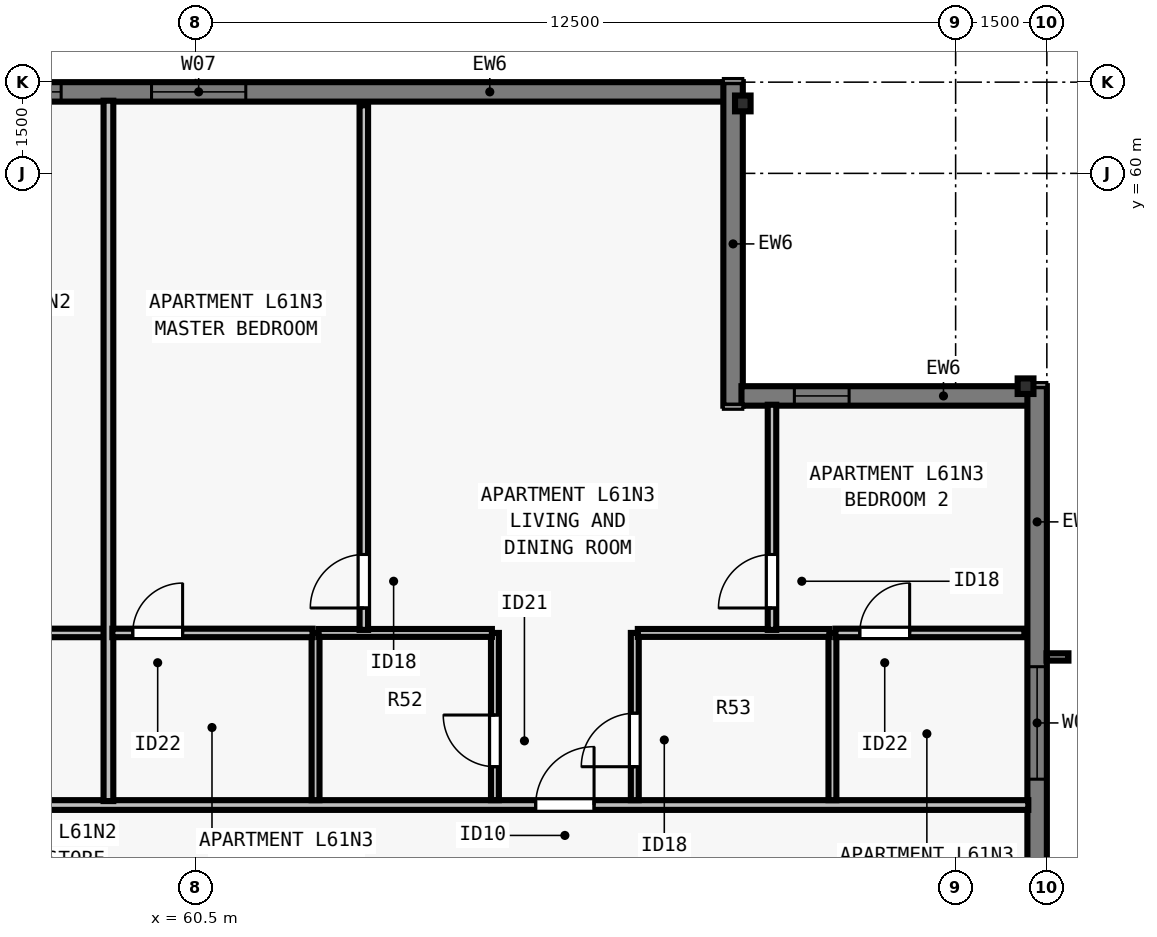
"""IFC4 building model, lengths in metres.
Left out: names, types, materials, properties, quantities, classifications, styles, units other than length and angle.
Written with IfcOpenShell. Run it as: python <this file> out.ifc"""

import sys

from ifc_helpers import new_model, si_unit, direction, frame, frame_2d, origin, origin_2d, place, context, subcontext, project, spatial, rectangle, i_section, extrude, element, fill, save


model = new_model("IFC4")
c1 = context("Model", 3, precision=1e-05, world=origin(), true_north=direction((0.0, 1.0)))
c2 = subcontext(c1, "Body", "Model", "MODEL_VIEW")
j1 = project(units=[si_unit("LENGTHUNIT", "METRE"), si_unit("PLANEANGLEUNIT", "RADIAN")], contexts=[c1])
p1 = place(None, origin())
s1 = spatial("IfcSite", under=j1, at=p1, CompositionType="ELEMENT")
p2 = place(p1, origin())
s2 = spatial("IfcBuilding", under=s1, at=p2, CompositionType="ELEMENT")
p3 = place(p2, frame((0.0, 0.0, 223.5)))
s3 = spatial("IfcBuildingStorey", under=s2, at=p3, CompositionType="ELEMENT", Elevation=223.5)
for number, where, z_axis, x_axis in (
    (1, (74.15, 56.5, 0.0), (0.0, 0.0, 1.0), (0.0, 1.0, 0.0)),
    (2, (69.5, 61.15, 0.0), (0.0, 0.0, 1.0), (1.0, 0.0, 0.0)),
):
    element("IfcColumn", number, at=place(p3, frame(where, z_axis=z_axis, x_axis=x_axis)), inside=s3, PredefinedType="COLUMN", context=c2, shape_type="SweptSolid", body=[
        extrude(i_section(OverallWidth=0.256, OverallDepth=0.26, WebThickness=0.01, FlangeThickness=0.017, FilletRadius=0.013, at=origin_2d()), origin(), (0.0, 0.0, 1.0), 3.5),
    ])
p4 = place(p3, frame((46.6, 61.34, 0.0), z_axis=(0.0, 0.0, 1.0), x_axis=(1.0, 0.0, 0.0)))
e3 = element("IfcWall", 3, at=p4, inside=s3, PredefinedType="SOLIDWALL", context=c2, shape_type="SweptSolid", body=[
    extrude(rectangle(XDim=22.602, YDim=0.32, at=frame_2d((11.301, 0.0))), origin(), (0.0, 0.0, 1.0), 3.29),
])
p5 = place(p4, frame((3.325, 0.0, 0.8)))
e4 = element("IfcOpeningElement", 4, at=p5, cuts=e3, PredefinedType="OPENING", context=c2, shape_type="SweptSolid", body=[
    extrude(rectangle(XDim=1.85, YDim=1.678, at=frame_2d((0.925, 0.839))), frame((0.0, 0.17, 0.0), z_axis=(0.0, -1.0, 0.0), x_axis=(1.0, 0.0, 0.0)), (0.0, 0.0, 1.0), 0.34),
])
p6 = place(p4, frame((5.726, 0.0, 0.8)))
e5 = element("IfcOpeningElement", 5, at=p6, cuts=e3, PredefinedType="OPENING", context=c2, shape_type="SweptSolid", body=[
    extrude(rectangle(XDim=1.55, YDim=1.678, at=frame_2d((0.775, 0.839))), frame((0.0, 0.17, 0.0), z_axis=(0.0, -1.0, 0.0), x_axis=(1.0, 0.0, 0.0)), (0.0, 0.0, 1.0), 0.34),
])
p7 = place(p4, frame((13.177, 0.0, 0.8)))
e6 = element("IfcOpeningElement", 6, at=p7, cuts=e3, PredefinedType="OPENING", context=c2, shape_type="SweptSolid", body=[
    extrude(rectangle(XDim=1.55, YDim=1.678, at=frame_2d((0.775, 0.839))), frame((0.0, 0.17, 0.0), z_axis=(0.0, -1.0, 0.0), x_axis=(1.0, 0.0, 0.0)), (0.0, 0.0, 1.0), 0.34),
])
p8 = place(p4, frame((1.19, 0.0, 0.8)))
e7 = element("IfcOpeningElement", 7, at=p8, cuts=e3, PredefinedType="OPENING", context=c2, shape_type="SweptSolid", body=[
    extrude(rectangle(XDim=0.9, YDim=1.678, at=frame_2d((0.45, 0.839))), frame((0.0, 0.17, 0.0), z_axis=(0.0, -1.0, 0.0), x_axis=(1.0, 0.0, 0.0)), (0.0, 0.0, 1.0), 0.34),
])
p9 = place(p4, frame((10.79, 0.0, 0.8)))
e8 = element("IfcOpeningElement", 8, at=p9, cuts=e3, PredefinedType="OPENING", context=c2, shape_type="SweptSolid", body=[
    extrude(rectangle(XDim=0.9, YDim=1.678, at=frame_2d((0.45, 0.839))), frame((0.0, 0.17, 0.0), z_axis=(0.0, -1.0, 0.0), x_axis=(1.0, 0.0, 0.0)), (0.0, 0.0, 1.0), 0.34),
])
p10 = place(p3, frame((69.34, 61.5, 0.0), z_axis=(0.0, 0.0, 1.0), x_axis=(0.0, -1.0, 0.0)))
e9 = element("IfcWall", 9, at=p10, inside=s3, PredefinedType="SOLIDWALL", context=c2, shape_type="SweptSolid", body=[
    extrude(rectangle(XDim=5.32, YDim=0.32, at=frame_2d((2.66, 0.0))), origin(), (0.0, 0.0, 1.0), 3.29),
])
p11 = place(p3, frame((69.478, 56.34, 0.0), z_axis=(0.0, 0.0, 1.0), x_axis=(1.0, 0.0, 0.0)))
e10 = element("IfcWall", 10, at=p11, inside=s3, PredefinedType="SOLIDWALL", context=c2, shape_type="SweptSolid", body=[
    extrude(rectangle(XDim=4.724, YDim=0.32, at=frame_2d((2.362, 0.0))), origin(), (0.0, 0.0, 1.0), 3.29),
])
p12 = place(p11, frame((0.87, 0.0, 0.8)))
e11 = element("IfcOpeningElement", 11, at=p12, cuts=e10, PredefinedType="OPENING", context=c2, shape_type="SweptSolid", body=[
    extrude(rectangle(XDim=0.9, YDim=1.678, at=frame_2d((0.45, 0.839))), frame((0.0, 0.17, 0.0), z_axis=(0.0, -1.0, 0.0), x_axis=(1.0, 0.0, 0.0)), (0.0, 0.0, 1.0), 0.34),
])
p13 = place(p3, frame((74.34, 56.5, 0.0), z_axis=(0.0, 0.0, 1.0), x_axis=(0.0, -1.0, 0.0)))
e12 = element("IfcWall", 12, at=p13, inside=s3, PredefinedType="SOLIDWALL", context=c2, shape_type="SweptSolid", body=[
    extrude(rectangle(XDim=34.702, YDim=0.32, at=frame_2d((17.351, 0.0))), origin(), (0.0, 0.0, 1.0), 3.29),
])
p14 = place(p13, frame((4.613, 0.0, 0.8)))
e13 = element("IfcOpeningElement", 13, at=p14, cuts=e12, PredefinedType="OPENING", context=c2, shape_type="SweptSolid", body=[
    extrude(rectangle(XDim=1.85, YDim=1.678, at=frame_2d((0.925, 0.839))), frame((0.0, 0.17, 0.0), z_axis=(0.0, -1.0, 0.0), x_axis=(1.0, 0.0, 0.0)), (0.0, 0.0, 1.0), 0.34),
])
p15 = place(p13, frame((9.388, 0.0, 0.8)))
e14 = element("IfcOpeningElement", 14, at=p15, cuts=e12, PredefinedType="OPENING", context=c2, shape_type="SweptSolid", body=[
    extrude(rectangle(XDim=1.55, YDim=1.678, at=frame_2d((0.775, 0.839))), frame((0.0, 0.17, 0.0), z_axis=(0.0, -1.0, 0.0), x_axis=(1.0, 0.0, 0.0)), (0.0, 0.0, 1.0), 0.34),
])
p16 = place(p13, frame((14.888, 0.0, 0.8)))
e15 = element("IfcOpeningElement", 15, at=p16, cuts=e12, PredefinedType="OPENING", context=c2, shape_type="SweptSolid", body=[
    extrude(rectangle(XDim=1.55, YDim=1.678, at=frame_2d((0.775, 0.839))), frame((0.0, 0.17, 0.0), z_axis=(0.0, -1.0, 0.0), x_axis=(1.0, 0.0, 0.0)), (0.0, 0.0, 1.0), 0.34),
])
p17 = place(p13, frame((18.114, 0.0, 0.8)))
e16 = element("IfcOpeningElement", 16, at=p17, cuts=e12, PredefinedType="OPENING", context=c2, shape_type="SweptSolid", body=[
    extrude(rectangle(XDim=1.85, YDim=1.678, at=frame_2d((0.925, 0.839))), frame((0.0, 0.17, 0.0), z_axis=(0.0, -1.0, 0.0), x_axis=(1.0, 0.0, 0.0)), (0.0, 0.0, 1.0), 0.34),
])
p18 = place(p13, frame((23.614, 0.0, 0.8)))
e17 = element("IfcOpeningElement", 17, at=p18, cuts=e12, PredefinedType="OPENING", context=c2, shape_type="SweptSolid", body=[
    extrude(rectangle(XDim=1.85, YDim=1.678, at=frame_2d((0.925, 0.839))), frame((0.0, 0.17, 0.0), z_axis=(0.0, -1.0, 0.0), x_axis=(1.0, 0.0, 0.0)), (0.0, 0.0, 1.0), 0.34),
])
p19 = place(p13, frame((28.839, 0.0, 0.8)))
e18 = element("IfcOpeningElement", 18, at=p19, cuts=e12, PredefinedType="OPENING", context=c2, shape_type="SweptSolid", body=[
    extrude(rectangle(XDim=1.55, YDim=1.678, at=frame_2d((0.775, 0.839))), frame((0.0, 0.17, 0.0), z_axis=(0.0, -1.0, 0.0), x_axis=(1.0, 0.0, 0.0)), (0.0, 0.0, 1.0), 0.34),
])
p20 = place(p13, frame((31.35, 0.0, 0.8)))
e19 = element("IfcOpeningElement", 19, at=p20, cuts=e12, PredefinedType="OPENING", context=c2, shape_type="SweptSolid", body=[
    extrude(rectangle(XDim=0.9, YDim=1.678, at=frame_2d((0.45, 0.839))), frame((0.0, 0.17, 0.0), z_axis=(0.0, -1.0, 0.0), x_axis=(1.0, 0.0, 0.0)), (0.0, 0.0, 1.0), 0.34),
])
p21 = place(p3, frame((29.805, 49.613, 0.0), z_axis=(0.0, 0.0, 1.0), x_axis=(1.0, 0.0, 0.0)))
e20 = element("IfcWall", 20, at=p21, inside=s3, PredefinedType="PARTITIONING", context=c2, shape_type="SweptSolid", body=[
    extrude(rectangle(XDim=44.39, YDim=0.16, at=frame_2d((22.195, 0.0))), origin(), (0.0, 0.0, 1.0), 2.958),
])
p22 = place(p21, frame((7.206, 0.0, 0.0)))
e21 = element("IfcOpeningElement", 21, at=p22, cuts=e20, PredefinedType="OPENING", context=c2, shape_type="SweptSolid", body=[
    extrude(rectangle(XDim=0.96, YDim=2.18, at=frame_2d((0.48, 1.09))), frame((0.0, 0.09, 0.0), z_axis=(0.0, -1.0, 0.0), x_axis=(1.0, 0.0, 0.0)), (0.0, 0.0, 1.0), 0.18),
])
p23 = place(p21, frame((21.78, 0.0, 0.0)))
e22 = element("IfcOpeningElement", 22, at=p23, cuts=e20, PredefinedType="OPENING", context=c2, shape_type="SweptSolid", body=[
    extrude(rectangle(XDim=0.96, YDim=2.18, at=frame_2d((0.48, 1.09))), frame((0.0, 0.09, 0.0), z_axis=(0.0, -1.0, 0.0), x_axis=(1.0, 0.0, 0.0)), (0.0, 0.0, 1.0), 0.18),
])
p24 = place(p21, frame((36.289, 0.0, 0.0)))
e23 = element("IfcOpeningElement", 23, at=p24, cuts=e20, PredefinedType="OPENING", context=c2, shape_type="SweptSolid", body=[
    extrude(rectangle(XDim=0.96, YDim=2.18, at=frame_2d((0.48, 1.09))), frame((0.0, 0.09, 0.0), z_axis=(0.0, -1.0, 0.0), x_axis=(1.0, 0.0, 0.0)), (0.0, 0.0, 1.0), 0.18),
])
p25 = place(p3, frame((56.515, 52.442, 0.0), z_axis=(0.0, 0.0, 1.0), x_axis=(1.0, 0.0, 0.0)))
e24 = element("IfcWall", 24, at=p25, inside=s3, PredefinedType="PARTITIONING", context=c2, shape_type="SweptSolid", body=[
    extrude(rectangle(XDim=2.603, YDim=0.14, at=frame_2d((1.301, 0.0))), origin(), (0.0, 0.0, 1.0), 3.29),
])
p26 = place(p25, frame((0.4, 0.0, 0.0)))
e25 = element("IfcOpeningElement", 25, at=p26, cuts=e24, PredefinedType="OPENING", context=c2, shape_type="SweptSolid", body=[
    extrude(rectangle(XDim=0.82, YDim=2.1, at=frame_2d((0.41, 1.05))), frame((0.0, 0.08, 0.0), z_axis=(0.0, -1.0, 0.0), x_axis=(1.0, 0.0, 0.0)), (0.0, 0.0, 1.0), 0.16),
])
p27 = place(p3, frame((59.067, 49.677, 0.0), z_axis=(0.0, 0.0, 1.0), x_axis=(0.0, 1.0, 0.0)))
e26 = element("IfcWall", 26, at=p27, inside=s3, PredefinedType="PARTITIONING", context=c2, shape_type="SweptSolid", body=[
    extrude(rectangle(XDim=11.518, YDim=0.16, at=frame_2d((5.759, 0.0))), origin(), (0.0, 0.0, 1.0), 3.29),
])
p28 = place(p3, frame((62.474, 49.692, 0.0), z_axis=(0.0, 0.0, 1.0), x_axis=(0.0, 1.0, 0.0)))
e27 = element("IfcWall", 27, at=p28, inside=s3, PredefinedType="PLUMBINGWALL", context=c2, shape_type="SweptSolid", body=[
    extrude(rectangle(XDim=2.75, YDim=0.13, at=frame_2d((1.375, 0.0))), origin(), (0.0, 0.0, 1.0), 2.573),
])
p29 = place(p3, frame((65.424, 49.692, 0.0), z_axis=(0.0, 0.0, 1.0), x_axis=(0.0, 1.0, 0.0)))
e28 = element("IfcWall", 28, at=p29, inside=s3, PredefinedType="PLUMBINGWALL", context=c2, shape_type="SweptSolid", body=[
    extrude(rectangle(XDim=2.75, YDim=0.13, at=frame_2d((1.375, 0.0))), origin(), (0.0, 0.0, 1.0), 3.29),
])
p30 = place(p29, frame((0.55, 0.0, 0.0)))
e29 = element("IfcOpeningElement", 29, at=p30, cuts=e28, PredefinedType="OPENING", context=c2, shape_type="SweptSolid", body=[
    extrude(rectangle(XDim=0.85, YDim=2.08, at=frame_2d((0.425, 1.04))), frame((0.0, 0.075, 0.0), z_axis=(0.0, -1.0, 0.0), x_axis=(1.0, 0.0, 0.0)), (0.0, 0.0, 1.0), 0.15),
])
p31 = place(p3, frame((62.524, 52.442, 0.0), z_axis=(0.0, 0.0, 1.0), x_axis=(1.0, 0.0, 0.0)))
e30 = element("IfcWall", 30, at=p31, inside=s3, PredefinedType="PLUMBINGWALL", context=c2, shape_type="SweptSolid", body=[
    extrude(rectangle(XDim=2.85, YDim=0.13, at=frame_2d((1.425, 0.0))), origin(), (0.0, 0.0, 1.0), 3.29),
])
p32 = place(p3, frame((70.974, 49.692, 0.0), z_axis=(0.0, 0.0, 1.0), x_axis=(0.0, 1.0, 0.0)))
e31 = element("IfcWall", 31, at=p32, inside=s3, PredefinedType="PLUMBINGWALL", context=c2, shape_type="SweptSolid", body=[
    extrude(rectangle(XDim=2.75, YDim=0.13, at=frame_2d((1.375, 0.0))), origin(), (0.0, 0.0, 1.0), 3.29),
])
p33 = place(p3, frame((67.724, 49.692, 0.0), z_axis=(0.0, 0.0, 1.0), x_axis=(0.0, 1.0, 0.0)))
e32 = element("IfcWall", 32, at=p33, inside=s3, PredefinedType="PLUMBINGWALL", context=c2, shape_type="SweptSolid", body=[
    extrude(rectangle(XDim=2.75, YDim=0.13, at=frame_2d((1.375, 0.0))), origin(), (0.0, 0.0, 1.0), 3.29),
])
p34 = place(p33, frame((0.55, 0.0, 0.0)))
e33 = element("IfcOpeningElement", 33, at=p34, cuts=e32, PredefinedType="OPENING", context=c2, shape_type="SweptSolid", body=[
    extrude(rectangle(XDim=0.88, YDim=2.1, at=frame_2d((0.44, 1.05))), frame((0.0, 0.075, 0.0), z_axis=(0.0, -1.0, 0.0), x_axis=(1.0, 0.0, 0.0)), (0.0, 0.0, 1.0), 0.15),
])
p35 = place(p3, frame((67.774, 52.442, 0.0), z_axis=(0.0, 0.0, 1.0), x_axis=(1.0, 0.0, 0.0)))
e34 = element("IfcWall", 34, at=p35, inside=s3, PredefinedType="PLUMBINGWALL", context=c2, shape_type="SweptSolid", body=[
    extrude(rectangle(XDim=3.15, YDim=0.13, at=frame_2d((1.575, 0.0))), origin(), (0.0, 0.0, 1.0), 2.958),
])
p36 = place(p3, frame((63.268, 52.492, 0.0), z_axis=(0.0, 0.0, 1.0), x_axis=(0.0, 1.0, 0.0)))
e35 = element("IfcWall", 35, at=p36, inside=s3, PredefinedType="PARTITIONING", context=c2, shape_type="SweptSolid", body=[
    extrude(rectangle(XDim=8.628, YDim=0.14, at=frame_2d((4.314, 0.0))), origin(), (0.0, 0.0, 1.0), 3.29),
])
p37 = place(p36, frame((0.36, 0.0, 0.0)))
e36 = element("IfcOpeningElement", 36, at=p37, cuts=e35, PredefinedType="OPENING", context=c2, shape_type="SweptSolid", body=[
    extrude(rectangle(XDim=0.88, YDim=2.1, at=frame_2d((0.44, 1.05))), frame((0.0, 0.08, 0.0), z_axis=(0.0, -1.0, 0.0), x_axis=(1.0, 0.0, 0.0)), (0.0, 0.0, 1.0), 0.16),
])
p38 = place(p3, frame((59.133, 52.442, 0.0), z_axis=(0.0, 0.0, 1.0), x_axis=(1.0, 0.0, 0.0)))
e37 = element("IfcWall", 37, at=p38, inside=s3, PredefinedType="PARTITIONING", context=c2, shape_type="SweptSolid", body=[
    extrude(rectangle(XDim=3.291, YDim=0.14, at=frame_2d((1.646, 0.0))), origin(), (0.0, 0.0, 1.0), 3.29),
])
p39 = place(p38, frame((0.335, 0.0, 0.0)))
e38 = element("IfcOpeningElement", 38, at=p39, cuts=e37, PredefinedType="OPENING", context=c2, shape_type="SweptSolid", body=[
    extrude(rectangle(XDim=0.82, YDim=2.1, at=frame_2d((0.41, 1.05))), frame((0.0, 0.08, 0.0), z_axis=(0.0, -1.0, 0.0), x_axis=(1.0, 0.0, 0.0)), (0.0, 0.0, 1.0), 0.16),
])
p40 = place(p3, frame((69.98, 52.492, 0.0), z_axis=(0.0, 0.0, 1.0), x_axis=(0.0, 1.0, 0.0)))
e39 = element("IfcWall", 39, at=p40, inside=s3, PredefinedType="PARTITIONING", context=c2, shape_type="SweptSolid", body=[
    extrude(rectangle(XDim=3.703, YDim=0.14, at=frame_2d((1.851, 0.0))), origin(), (0.0, 0.0, 1.0), 3.29),
])
p41 = place(p40, frame((0.36, 0.0, 0.0)))
e40 = element("IfcOpeningElement", 40, at=p41, cuts=e39, PredefinedType="OPENING", context=c2, shape_type="SweptSolid", body=[
    extrude(rectangle(XDim=0.88, YDim=2.1, at=frame_2d((0.44, 1.05))), frame((0.0, 0.08, 0.0), z_axis=(0.0, -1.0, 0.0), x_axis=(1.0, 0.0, 0.0)), (0.0, 0.0, 1.0), 0.16),
])
p42 = place(p3, frame((71.024, 52.442, 0.0), z_axis=(0.0, 0.0, 1.0), x_axis=(1.0, 0.0, 0.0)))
e41 = element("IfcWall", 41, at=p42, inside=s3, PredefinedType="PARTITIONING", context=c2, shape_type="SweptSolid", body=[
    extrude(rectangle(XDim=3.106, YDim=0.14, at=frame_2d((1.553, 0.0))), origin(), (0.0, 0.0, 1.0), 3.29),
])
p43 = place(p42, frame((0.4, 0.0, 0.0)))
e42 = element("IfcOpeningElement", 42, at=p43, cuts=e41, PredefinedType="OPENING", context=c2, shape_type="SweptSolid", body=[
    extrude(rectangle(XDim=0.82, YDim=2.1, at=frame_2d((0.41, 1.05))), frame((0.0, 0.08, 0.0), z_axis=(0.0, -1.0, 0.0), x_axis=(1.0, 0.0, 0.0)), (0.0, 0.0, 1.0), 0.16),
])
p44 = place(p7, origin())
e43 = element("IfcWindow", 43, at=p44, inside=s3, PartitioningType="SINGLE_PANEL", PredefinedType="WINDOW", context=c2, shape_type="SweptSolid", body=[
    extrude(rectangle(XDim=1.55, YDim=1.678, at=frame_2d((0.775, 0.839))), frame((0.0, -0.05, 0.0), z_axis=(0.0, -1.0, 0.0), x_axis=(1.0, 0.0, 0.0)), (0.0, 0.0, 1.0), 0.06),
])
fill(e6, e43)
p45 = place(p14, origin())
e44 = element("IfcWindow", 44, at=p45, inside=s3, PartitioningType="SINGLE_PANEL", PredefinedType="WINDOW", context=c2, shape_type="SweptSolid", body=[
    extrude(rectangle(XDim=1.85, YDim=1.678, at=frame_2d((0.925, 0.839))), frame((0.0, -0.05, 0.0), z_axis=(0.0, -1.0, 0.0), x_axis=(1.0, 0.0, 0.0)), (0.0, 0.0, 1.0), 0.06),
])
fill(e13, e44)
p46 = place(p9, origin())
e45 = element("IfcWindow", 45, at=p46, inside=s3, PartitioningType="SINGLE_PANEL", PredefinedType="WINDOW", context=c2, shape_type="SweptSolid", body=[
    extrude(rectangle(XDim=0.9, YDim=1.678, at=frame_2d((0.45, 0.839))), frame((0.0, -0.04, 0.0), z_axis=(0.0, -1.0, 0.0), x_axis=(1.0, 0.0, 0.0)), (0.0, 0.0, 1.0), 0.06),
])
fill(e8, e45)
p47 = place(p12, origin())
e46 = element("IfcWindow", 46, at=p47, inside=s3, PartitioningType="SINGLE_PANEL", PredefinedType="WINDOW", context=c2, shape_type="SweptSolid", body=[
    extrude(rectangle(XDim=0.9, YDim=1.678, at=frame_2d((0.45, 0.839))), frame((0.0, -0.04, 0.0), z_axis=(0.0, -1.0, 0.0), x_axis=(1.0, 0.0, 0.0)), (0.0, 0.0, 1.0), 0.06),
])
fill(e11, e46)
p48 = place(p30, origin())
e47 = element("IfcDoor", 47, at=p48, inside=s3, OperationType="SINGLE_SWING_RIGHT", PredefinedType="DOOR", context=c2, shape_type="SweptSolid", body=[
    extrude(rectangle(XDim=0.85, YDim=2.08, at=frame_2d((0.425, 1.04))), frame((0.0, 0.025, 0.0), z_axis=(0.0, -1.0, 0.0), x_axis=(1.0, 0.0, 0.0)), (0.0, 0.0, 1.0), 0.05),
])
fill(e29, e47)
p49 = place(p34, origin())
e48 = element("IfcDoor", 48, at=p49, inside=s3, OperationType="SINGLE_SWING_LEFT", PredefinedType="DOOR", context=c2, shape_type="SweptSolid", body=[
    extrude(rectangle(XDim=0.88, YDim=2.1, at=frame_2d((0.44, 1.05))), frame((0.0, 0.025, 0.0), z_axis=(0.0, -1.0, 0.0), x_axis=(1.0, 0.0, 0.0)), (0.0, 0.0, 1.0), 0.05),
])
fill(e33, e48)
p50 = place(p39, origin())
e49 = element("IfcDoor", 49, at=p50, inside=s3, OperationType="SINGLE_SWING_RIGHT", PredefinedType="DOOR", context=c2, shape_type="SweptSolid", body=[
    extrude(rectangle(XDim=0.82, YDim=2.1, at=frame_2d((0.41, 1.05))), frame((0.0, 0.025, 0.0), z_axis=(0.0, -1.0, 0.0), x_axis=(1.0, 0.0, 0.0)), (0.0, 0.0, 1.0), 0.05),
])
fill(e38, e49)
p51 = place(p37, origin())
e50 = element("IfcDoor", 50, at=p51, inside=s3, OperationType="SINGLE_SWING_LEFT", PredefinedType="DOOR", context=c2, shape_type="SweptSolid", body=[
    extrude(rectangle(XDim=0.88, YDim=2.1, at=frame_2d((0.44, 1.05))), frame((0.0, 0.025, 0.0), z_axis=(0.0, -1.0, 0.0), x_axis=(1.0, 0.0, 0.0)), (0.0, 0.0, 1.0), 0.05),
])
fill(e36, e50)
p52 = place(p43, origin())
e51 = element("IfcDoor", 51, at=p52, inside=s3, OperationType="SINGLE_SWING_RIGHT", PredefinedType="DOOR", context=c2, shape_type="SweptSolid", body=[
    extrude(rectangle(XDim=0.82, YDim=2.1, at=frame_2d((0.41, 1.05))), frame((0.0, 0.025, 0.0), z_axis=(0.0, -1.0, 0.0), x_axis=(1.0, 0.0, 0.0)), (0.0, 0.0, 1.0), 0.05),
])
fill(e42, e51)
p53 = place(p41, origin())
e52 = element("IfcDoor", 52, at=p53, inside=s3, OperationType="SINGLE_SWING_LEFT", PredefinedType="DOOR", context=c2, shape_type="SweptSolid", body=[
    extrude(rectangle(XDim=0.88, YDim=2.1, at=frame_2d((0.44, 1.05))), frame((0.0, 0.025, 0.0), z_axis=(0.0, -1.0, 0.0), x_axis=(1.0, 0.0, 0.0)), (0.0, 0.0, 1.0), 0.05),
])
fill(e40, e52)
p54 = place(p24, origin())
e53 = element("IfcDoor", 53, at=p54, inside=s3, OperationType="SINGLE_SWING_RIGHT", PredefinedType="DOOR", context=c2, shape_type="SweptSolid", body=[
    extrude(rectangle(XDim=0.96, YDim=2.18, at=frame_2d((0.48, 1.09))), frame((0.0, 0.025, 0.0), z_axis=(0.0, -1.0, 0.0), x_axis=(1.0, 0.0, 0.0)), (0.0, 0.0, 1.0), 0.05),
])
fill(e23, e53)
save(model, sys.argv[1])
